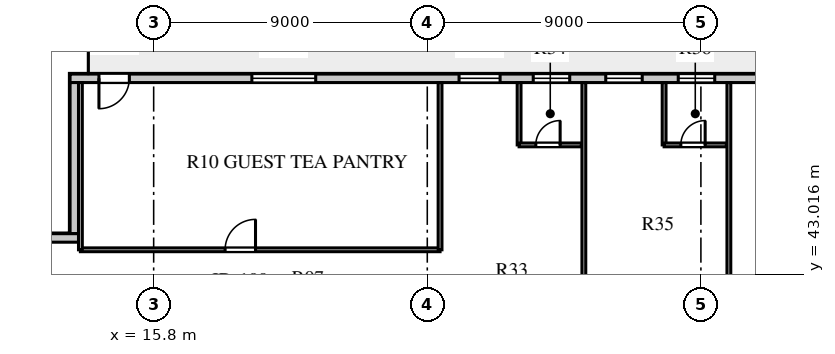
"""IFC4 building model, lengths in metres.
Left out: names, types, materials, properties, quantities, classifications, styles, units other than length and angle.
Written with IfcOpenShell. Run it as: python <this file> out.ifc"""

import sys

from ifc_helpers import new_model, si_unit, direction, frame, frame_2d, origin, place, context, subcontext, project, spatial, rectangle, extrude, element, fill, save


model = new_model("IFC4")
c1 = context("Model", 3, precision=1e-05, world=origin(), true_north=direction((0.0, 1.0)))
c2 = subcontext(c1, "Body", "Model", "MODEL_VIEW")
j1 = project(units=[si_unit("LENGTHUNIT", "METRE"), si_unit("PLANEANGLEUNIT", "RADIAN")], contexts=[c1])
p1 = place(None, origin())
s1 = spatial("IfcSite", under=j1, at=p1, CompositionType="ELEMENT")
p2 = place(p1, origin())
s2 = spatial("IfcBuilding", under=s1, at=p2, CompositionType="ELEMENT")
p3 = place(p2, frame((0.0, 0.0, 165.6)))
s3 = spatial("IfcBuildingStorey", under=s2, at=p3, CompositionType="ELEMENT", Elevation=165.6)
p4 = place(p3, frame((45.55, 49.46, 0.0), z_axis=(0.0, 0.0, 1.0), x_axis=(-1.0, 0.0, 0.0)))
e1 = element("IfcWall", 1, at=p4, inside=s3, PredefinedType="STANDARD", context=c2, shape_type="SweptSolid", body=[
    extrude(rectangle(XDim=32.5, YDim=0.28, at=frame_2d((16.25, 0.0))), origin(), (0.0, 0.0, 1.0), 3.6),
])
p5 = place(p4, frame((30.55, 0.0, 0.0)))
e2 = element("IfcOpeningElement", 2, at=p5, cuts=e1, PredefinedType="OPENING", context=c2, shape_type="SweptSolid", body=[
    extrude(rectangle(XDim=1.0, YDim=2.05, at=frame_2d((0.5, 1.025))), frame((0.0, 0.15, 0.0), z_axis=(0.0, -1.0, 0.0), x_axis=(1.0, 0.0, 0.0)), (0.0, 0.0, 1.0), 0.3),
])
p6 = place(p4, frame((24.42, 0.0, 0.8)))
e3 = element("IfcOpeningElement", 3, at=p6, cuts=e1, PredefinedType="OPENING", context=c2, shape_type="SweptSolid", body=[
    extrude(rectangle(XDim=2.1, YDim=1.95, at=frame_2d((1.05, 0.975))), frame((0.0, 0.15, 0.0), z_axis=(0.0, -1.0, 0.0), x_axis=(1.0, 0.0, 0.0)), (0.0, 0.0, 1.0), 0.3),
])
p7 = place(p4, frame((18.355, 0.0, 0.8)))
e4 = element("IfcOpeningElement", 4, at=p7, cuts=e1, PredefinedType="OPENING", context=c2, shape_type="SweptSolid", body=[
    extrude(rectangle(XDim=1.35, YDim=1.9, at=frame_2d((0.675, 0.95))), frame((0.0, 0.15, 0.0), z_axis=(0.0, -1.0, 0.0), x_axis=(1.0, 0.0, 0.0)), (0.0, 0.0, 1.0), 0.3),
])
p8 = place(p4, frame((16.065, 0.0, 0.8)))
e5 = element("IfcOpeningElement", 5, at=p8, cuts=e1, PredefinedType="OPENING", context=c2, shape_type="SweptSolid", body=[
    extrude(rectangle(XDim=1.2, YDim=1.75, at=frame_2d((0.6, 0.875))), frame((0.0, 0.15, 0.0), z_axis=(0.0, -1.0, 0.0), x_axis=(1.0, 0.0, 0.0)), (0.0, 0.0, 1.0), 0.3),
])
p9 = place(p4, frame((13.68, 0.0, 0.8)))
e6 = element("IfcOpeningElement", 6, at=p9, cuts=e1, PredefinedType="OPENING", context=c2, shape_type="SweptSolid", body=[
    extrude(rectangle(XDim=1.2, YDim=1.75, at=frame_2d((0.6, 0.875))), frame((0.0, 0.15, 0.0), z_axis=(0.0, -1.0, 0.0), x_axis=(1.0, 0.0, 0.0)), (0.0, 0.0, 1.0), 0.3),
])
p10 = place(p4, frame((11.295, 0.0, 0.8)))
e7 = element("IfcOpeningElement", 7, at=p10, cuts=e1, PredefinedType="OPENING", context=c2, shape_type="SweptSolid", body=[
    extrude(rectangle(XDim=1.2, YDim=1.75, at=frame_2d((0.6, 0.875))), frame((0.0, 0.15, 0.0), z_axis=(0.0, -1.0, 0.0), x_axis=(1.0, 0.0, 0.0)), (0.0, 0.0, 1.0), 0.3),
])
p11 = place(p4, frame((6.88, 0.0, 0.8)))
e8 = element("IfcOpeningElement", 8, at=p11, cuts=e1, PredefinedType="OPENING", context=c2, shape_type="SweptSolid", body=[
    extrude(rectangle(XDim=1.8, YDim=2.0, at=frame_2d((0.9, 1.0))), frame((0.0, 0.15, 0.0), z_axis=(0.0, -1.0, 0.0), x_axis=(1.0, 0.0, 0.0)), (0.0, 0.0, 1.0), 0.3),
])
p12 = place(p4, frame((1.67, 0.0, 0.8)))
e9 = element("IfcOpeningElement", 9, at=p12, cuts=e1, PredefinedType="OPENING", context=c2, shape_type="SweptSolid", body=[
    extrude(rectangle(XDim=1.5, YDim=2.0, at=frame_2d((0.75, 1.0))), frame((0.0, 0.15, 0.0), z_axis=(0.0, -1.0, 0.0), x_axis=(1.0, 0.0, 0.0)), (0.0, 0.0, 1.0), 0.3),
])
p13 = place(p3, frame((13.19, 49.32, 0.0), z_axis=(0.0, 0.0, 1.0), x_axis=(0.0, -1.0, 0.0)))
e10 = element("IfcWall", 10, at=p13, inside=s3, PredefinedType="STANDARD", context=c2, shape_type="SweptSolid", body=[
    extrude(rectangle(XDim=4.97, YDim=0.28, at=frame_2d((2.485, 0.0))), origin(), (0.0, 0.0, 1.0), 3.6),
])
p14 = place(p3, frame((13.33, 44.21, 0.0), z_axis=(0.0, 0.0, 1.0), x_axis=(-1.0, 0.0, 0.0)))
e11 = element("IfcWall", 11, at=p14, inside=s3, PredefinedType="STANDARD", context=c2, shape_type="SweptSolid", body=[
    extrude(rectangle(XDim=5.53, YDim=0.28, at=frame_2d((2.765, 0.0))), origin(), (0.0, 0.0, 1.0), 3.6),
])
p15 = place(p3, frame((13.39, 43.82, 0.0), z_axis=(0.0, 0.0, 1.0), x_axis=(1.0, 0.0, 0.0)))
e12 = element("IfcWall", 12, at=p15, inside=s3, PredefinedType="PLUMBINGWALL", context=c2, shape_type="SweptSolid", body=[
    extrude(rectangle(XDim=11.83, YDim=0.125, at=frame_2d((5.915, 0.0))), origin(), (0.0, 0.0, 1.0), 3.6),
])
p16 = place(p15, frame((4.76, 0.0, 0.0)))
e13 = element("IfcOpeningElement", 13, at=p16, cuts=e12, PredefinedType="OPENING", context=c2, shape_type="SweptSolid", body=[
    extrude(rectangle(XDim=1.0, YDim=2.08, at=frame_2d((0.5, 1.04))), frame((0.0, 0.073, 0.0), z_axis=(0.0, -1.0, 0.0), x_axis=(1.0, 0.0, 0.0)), (0.0, 0.0, 1.0), 0.145),
])
p17 = place(p3, frame((13.39, 43.82, 0.0), z_axis=(0.0, 0.0, 1.0), x_axis=(0.0, 1.0, 0.0)))
e14 = element("IfcWall", 14, at=p17, inside=s3, PredefinedType="PLUMBINGWALL", context=c2, shape_type="SweptSolid", body=[
    extrude(rectangle(XDim=5.5, YDim=0.125, at=frame_2d((2.75, 0.0))), origin(), (0.0, 0.0, 1.0), 3.6),
])
p18 = place(p3, frame((25.22, 43.82, 0.0), z_axis=(0.0, 0.0, 1.0), x_axis=(0.0, 1.0, 0.0)))
e15 = element("IfcWall", 15, at=p18, inside=s3, PredefinedType="PLUMBINGWALL", context=c2, shape_type="SweptSolid", body=[
    extrude(rectangle(XDim=5.5, YDim=0.125, at=frame_2d((2.75, 0.0))), origin(), (0.0, 0.0, 1.0), 3.15),
])
p19 = place(p3, frame((34.72, 35.22, 0.0), z_axis=(0.0, 0.0, 1.0), x_axis=(0.0, 1.0, 0.0)))
e16 = element("IfcWall", 16, at=p19, inside=s3, PredefinedType="PLUMBINGWALL", context=c2, shape_type="SweptSolid", body=[
    extrude(rectangle(XDim=14.1, YDim=0.125, at=frame_2d((7.05, 0.0))), origin(), (0.0, 0.0, 1.0), 3.6),
])
p20 = place(p3, frame((29.95, 35.3, 0.0), z_axis=(0.0, 0.0, 1.0), x_axis=(0.0, 1.0, 0.0)))
e17 = element("IfcWall", 17, at=p20, inside=s3, PredefinedType="PLUMBINGWALL", context=c2, shape_type="SweptSolid", body=[
    extrude(rectangle(XDim=14.02, YDim=0.125, at=frame_2d((7.01, 0.0))), origin(), (0.0, 0.0, 1.0), 3.6),
])
p21 = place(p3, frame((27.82, 47.27, 0.0), z_axis=(0.0, 0.0, 1.0), x_axis=(0.0, 1.0, 0.0)))
e18 = element("IfcWall", 18, at=p21, inside=s3, PredefinedType="PLUMBINGWALL", context=c2, shape_type="SweptSolid", body=[
    extrude(rectangle(XDim=2.05, YDim=0.125, at=frame_2d((1.025, 0.0))), origin(), (0.0, 0.0, 1.0), 3.6),
])
p22 = place(p3, frame((27.82, 47.27, 0.0), z_axis=(0.0, 0.0, 1.0), x_axis=(1.0, 0.0, 0.0)))
e19 = element("IfcWall", 19, at=p22, inside=s3, PredefinedType="PLUMBINGWALL", context=c2, shape_type="SweptSolid", body=[
    extrude(rectangle(XDim=2.05, YDim=0.125, at=frame_2d((1.025, 0.0))), origin(), (0.0, 0.0, 1.0), 3.6),
])
p23 = place(p22, frame((0.55, 0.0, 0.0)))
e20 = element("IfcOpeningElement", 20, at=p23, cuts=e19, PredefinedType="OPENING", context=c2, shape_type="SweptSolid", body=[
    extrude(rectangle(XDim=0.8, YDim=2.05, at=frame_2d((0.4, 1.025))), frame((0.0, 0.073, 0.0), z_axis=(0.0, -1.0, 0.0), x_axis=(1.0, 0.0, 0.0)), (0.0, 0.0, 1.0), 0.145),
])
p24 = place(p3, frame((32.59, 47.27, 0.0), z_axis=(0.0, 0.0, 1.0), x_axis=(0.0, 1.0, 0.0)))
e21 = element("IfcWall", 21, at=p24, inside=s3, PredefinedType="PLUMBINGWALL", context=c2, shape_type="SweptSolid", body=[
    extrude(rectangle(XDim=2.05, YDim=0.125, at=frame_2d((1.025, 0.0))), origin(), (0.0, 0.0, 1.0), 3.6),
])
p25 = place(p3, frame((32.59, 47.27, 0.0), z_axis=(0.0, 0.0, 1.0), x_axis=(1.0, 0.0, 0.0)))
e22 = element("IfcWall", 22, at=p25, inside=s3, PredefinedType="PLUMBINGWALL", context=c2, shape_type="SweptSolid", body=[
    extrude(rectangle(XDim=2.05, YDim=0.125, at=frame_2d((1.025, 0.0))), origin(), (0.0, 0.0, 1.0), 3.6),
])
p26 = place(p25, frame((0.55, 0.0, 0.0)))
e23 = element("IfcOpeningElement", 23, at=p26, cuts=e22, PredefinedType="OPENING", context=c2, shape_type="SweptSolid", body=[
    extrude(rectangle(XDim=0.8, YDim=2.05, at=frame_2d((0.4, 1.025))), frame((0.0, 0.073, 0.0), z_axis=(0.0, -1.0, 0.0), x_axis=(1.0, 0.0, 0.0)), (0.0, 0.0, 1.0), 0.145),
])
p27 = place(p5, frame((1.0, 0.0, 0.0), z_axis=(0.0, 0.0, 1.0), x_axis=(-1.0, 0.0, 0.0)))
e24 = element("IfcDoor", 24, at=p27, inside=s3, OperationType="SINGLE_SWING_LEFT", PredefinedType="DOOR", context=c2, shape_type="SweptSolid", body=[
    extrude(rectangle(XDim=1.0, YDim=2.05, at=frame_2d((0.5, 1.025))), frame((0.0, 0.025, 0.0), z_axis=(0.0, -1.0, 0.0), x_axis=(1.0, 0.0, 0.0)), (0.0, 0.0, 1.0), 0.05),
])
fill(e2, e24)
p28 = place(p6, origin())
e25 = element("IfcWindow", 25, at=p28, inside=s3, PartitioningType="SINGLE_PANEL", PredefinedType="WINDOW", context=c2, shape_type="SweptSolid", body=[
    extrude(rectangle(XDim=2.1, YDim=1.95, at=frame_2d((1.05, 0.975))), frame((0.0, 0.03, 0.0), z_axis=(0.0, -1.0, 0.0), x_axis=(1.0, 0.0, 0.0)), (0.0, 0.0, 1.0), 0.06),
])
fill(e3, e25)
p29 = place(p7, origin())
e26 = element("IfcWindow", 26, at=p29, inside=s3, PartitioningType="SINGLE_PANEL", PredefinedType="WINDOW", context=c2, shape_type="SweptSolid", body=[
    extrude(rectangle(XDim=1.35, YDim=1.9, at=frame_2d((0.675, 0.95))), frame((0.0, 0.03, 0.0), z_axis=(0.0, -1.0, 0.0), x_axis=(1.0, 0.0, 0.0)), (0.0, 0.0, 1.0), 0.06),
])
fill(e4, e26)
p30 = place(p8, origin())
e27 = element("IfcWindow", 27, at=p30, inside=s3, PartitioningType="SINGLE_PANEL", PredefinedType="WINDOW", context=c2, shape_type="SweptSolid", body=[
    extrude(rectangle(XDim=1.2, YDim=1.75, at=frame_2d((0.6, 0.875))), frame((0.0, 0.03, 0.0), z_axis=(0.0, -1.0, 0.0), x_axis=(1.0, 0.0, 0.0)), (0.0, 0.0, 1.0), 0.06),
])
fill(e5, e27)
p31 = place(p9, origin())
e28 = element("IfcWindow", 28, at=p31, inside=s3, PartitioningType="SINGLE_PANEL", PredefinedType="WINDOW", context=c2, shape_type="SweptSolid", body=[
    extrude(rectangle(XDim=1.2, YDim=1.75, at=frame_2d((0.6, 0.875))), frame((0.0, 0.03, 0.0), z_axis=(0.0, -1.0, 0.0), x_axis=(1.0, 0.0, 0.0)), (0.0, 0.0, 1.0), 0.06),
])
fill(e6, e28)
p32 = place(p10, origin())
e29 = element("IfcWindow", 29, at=p32, inside=s3, PartitioningType="SINGLE_PANEL", PredefinedType="WINDOW", context=c2, shape_type="SweptSolid", body=[
    extrude(rectangle(XDim=1.2, YDim=1.75, at=frame_2d((0.6, 0.875))), frame((0.0, 0.03, 0.0), z_axis=(0.0, -1.0, 0.0), x_axis=(1.0, 0.0, 0.0)), (0.0, 0.0, 1.0), 0.06),
])
fill(e7, e29)
p33 = place(p16, origin())
e30 = element("IfcDoor", 30, at=p33, inside=s3, OperationType="SINGLE_SWING_RIGHT", PredefinedType="DOOR", context=c2, shape_type="SweptSolid", body=[
    extrude(rectangle(XDim=1.0, YDim=2.08, at=frame_2d((0.5, 1.04))), frame((0.0, 0.025, 0.0), z_axis=(0.0, -1.0, 0.0), x_axis=(1.0, 0.0, 0.0)), (0.0, 0.0, 1.0), 0.05),
])
fill(e13, e30)
p34 = place(p23, frame((0.8, 0.0, 0.0), z_axis=(0.0, 0.0, 1.0), x_axis=(-1.0, 0.0, 0.0)))
e31 = element("IfcDoor", 31, at=p34, inside=s3, OperationType="SINGLE_SWING_LEFT", PredefinedType="DOOR", context=c2, shape_type="SweptSolid", body=[
    extrude(rectangle(XDim=0.8, YDim=2.05, at=frame_2d((0.4, 1.025))), frame((0.0, 0.025, 0.0), z_axis=(0.0, -1.0, 0.0), x_axis=(1.0, 0.0, 0.0)), (0.0, 0.0, 1.0), 0.05),
])
fill(e20, e31)
p35 = place(p26, frame((0.8, 0.0, 0.0), z_axis=(0.0, 0.0, 1.0), x_axis=(-1.0, 0.0, 0.0)))
e32 = element("IfcDoor", 32, at=p35, inside=s3, OperationType="SINGLE_SWING_LEFT", PredefinedType="DOOR", context=c2, shape_type="SweptSolid", body=[
    extrude(rectangle(XDim=0.8, YDim=2.05, at=frame_2d((0.4, 1.025))), frame((0.0, 0.025, 0.0), z_axis=(0.0, -1.0, 0.0), x_axis=(1.0, 0.0, 0.0)), (0.0, 0.0, 1.0), 0.05),
])
fill(e23, e32)
save(model, sys.argv[1])
